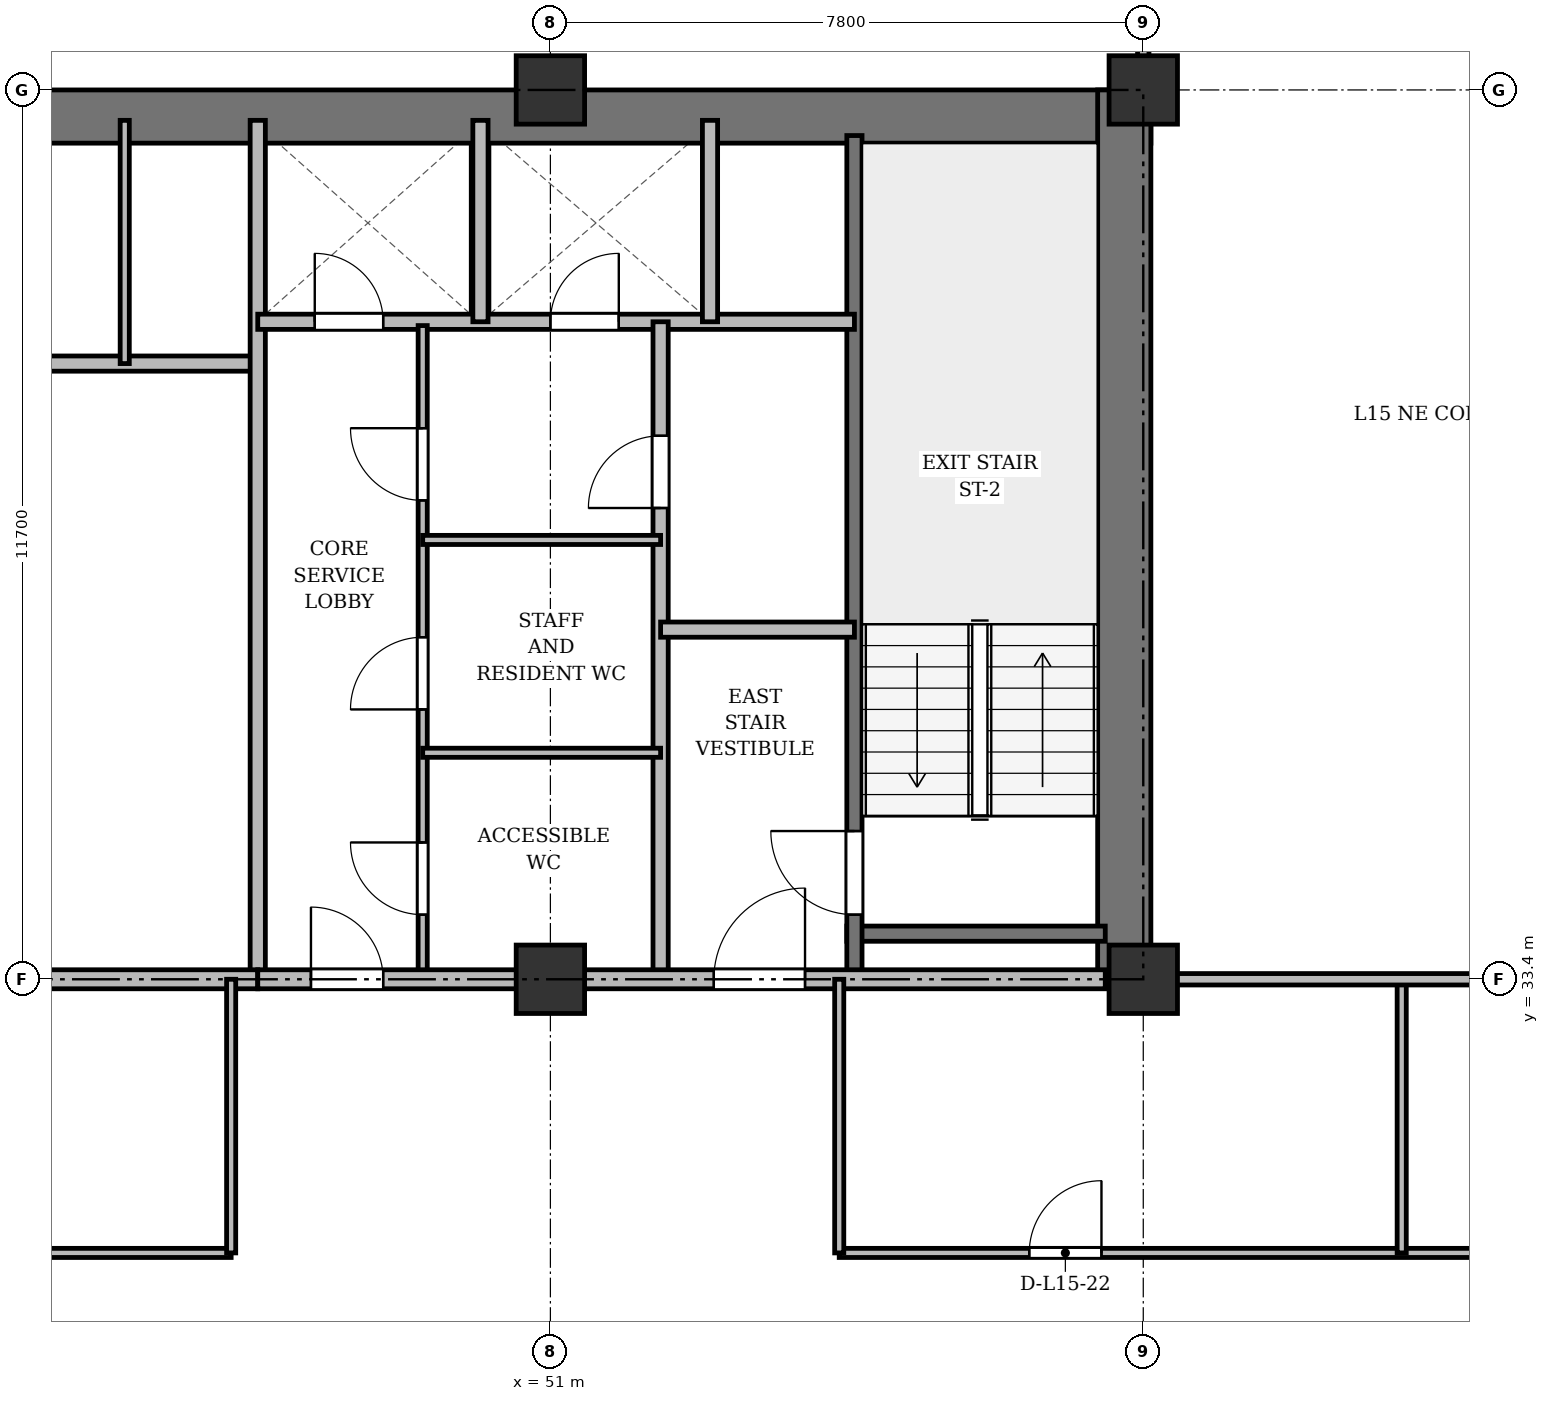
"""IFC4 building model, lengths in metres.
Left out: names, types, materials, properties, quantities, classifications, styles, units other than length and angle.
Written with IfcOpenShell. Run it as: python <this file> out.ifc"""

import sys

from ifc_helpers import new_model, si_unit, direction, frame, frame_2d, origin, origin_2d, place, context, subcontext, project, spatial, rectangle, extrude, source, transform, mapped, element, fill, save


model = new_model("IFC4")
c1 = context("Model", 3, precision=1e-05, world=origin(), true_north=direction((0.0, 1.0)))
c2 = subcontext(c1, "Body", "Model", "MODEL_VIEW")
j1 = project(units=[si_unit("LENGTHUNIT", "METRE"), si_unit("PLANEANGLEUNIT", "RADIAN")], contexts=[c1])
p1 = place(None, origin())
s1 = spatial("IfcSite", under=j1, at=p1, CompositionType="ELEMENT")
p2 = place(p1, origin())
s2 = spatial("IfcBuilding", under=s1, at=p2, CompositionType="ELEMENT")
p3 = place(p2, frame((0.0, 0.0, 59.5)))
s3 = spatial("IfcBuildingStorey", under=s2, at=p3, CompositionType="ELEMENT", Elevation=59.5)
m1 = source(origin(), c2, "Body", "SweptSolid", [
    extrude(rectangle(XDim=0.9, YDim=0.9, at=origin_2d()), origin(), (0.0, 0.0, 1.0), 3.6),
])
for number, where, z_axis, x_axis in (
    (1, (51.0, 33.4, 0.0), (0.0, 0.0, 1.0), (1.0, 0.0, 0.0)),
    (2, (51.0, 45.1, 0.0), (0.0, 0.0, 1.0), (1.0, 0.0, 0.0)),
    (3, (58.8, 33.4, 0.0), (0.0, 0.0, 1.0), (1.0, 0.0, 0.0)),
    (4, (58.8, 45.1, 0.0), (0.0, 0.0, 1.0), (1.0, 0.0, 0.0)),
):
    element("IfcColumn", number, at=place(p3, frame(where, z_axis=z_axis, x_axis=x_axis)), inside=s3, PredefinedType="COLUMN", context=c2, shape_type="MappedRepresentation", body=[
        mapped(m1, transform((0.0, 0.0, 0.0), x_axis=(1.0, 0.0, 0.0), y_axis=(0.0, 1.0, 0.0), z_axis=(0.0, 0.0, 1.0), scale=1.0)),
    ])
p4 = place(p3, frame((15.5, 44.75, 0.0), z_axis=(0.0, 0.0, 1.0), x_axis=(1.0, 0.0, 0.0)))
e5 = element("IfcWall", 5, at=p4, inside=s3, PredefinedType="SHEAR", context=c2, shape_type="SweptSolid", body=[
    extrude(rectangle(XDim=43.4, YDim=0.7, at=frame_2d((21.7, 0.0))), origin(), (0.0, 0.0, 1.0), 3.34),
])
p5 = place(p3, frame((58.55, 33.4, 0.0), z_axis=(0.0, 0.0, 1.0), x_axis=(0.0, 1.0, 0.0)))
e6 = element("IfcWall", 6, at=p5, inside=s3, PredefinedType="SHEAR", context=c2, shape_type="SweptSolid", body=[
    extrude(rectangle(XDim=11.7, YDim=0.7, at=frame_2d((5.85, 0.0))), origin(), (0.0, 0.0, 1.0), 3.34),
])
p6 = place(p3, frame((54.9, 34.0, 0.0), z_axis=(0.0, 0.0, 1.0), x_axis=(1.0, 0.0, 0.0)))
e7 = element("IfcWall", 7, at=p6, inside=s3, PredefinedType="SHEAR", context=c2, shape_type="SweptSolid", body=[
    extrude(rectangle(XDim=3.4, YDim=0.2, at=frame_2d((1.7, 0.0))), origin(), (0.0, 0.0, 1.0), 3.34),
])
p7 = place(p3, frame((55.0, 33.4, 0.0), z_axis=(0.0, 0.0, 1.0), x_axis=(0.0, 1.0, 0.0)))
e8 = element("IfcWall", 8, at=p7, inside=s3, PredefinedType="SHEAR", context=c2, shape_type="SweptSolid", body=[
    extrude(rectangle(XDim=11.1, YDim=0.2, at=frame_2d((5.55, 0.0))), origin(), (0.0, 0.0, 1.0), 3.34),
])
p8 = place(p7, frame((0.85, 0.0, 0.0)))
e9 = element("IfcOpeningElement", 9, at=p8, cuts=e8, PredefinedType="OPENING", context=c2, shape_type="SweptSolid", body=[
    extrude(rectangle(XDim=1.1, YDim=2.15, at=frame_2d((0.55, 1.075))), frame((0.0, 0.11, 0.0), z_axis=(0.0, -1.0, 0.0), x_axis=(1.0, 0.0, 0.0)), (0.0, 0.0, 1.0), 0.22),
])
p9 = place(p3, frame((40.25, 41.5, 0.0), z_axis=(0.0, 0.0, 1.0), x_axis=(1.0, 0.0, 0.0)))
e10 = element("IfcWall", 10, at=p9, inside=s3, PredefinedType="SOLIDWALL", context=c2, shape_type="SweptSolid", body=[
    extrude(rectangle(XDim=6.9, YDim=0.2, at=frame_2d((3.45, 0.0))), origin(), (0.0, 0.0, 1.0), 2.752),
])
p10 = place(p3, frame((45.4, 41.5, 0.0), z_axis=(0.0, 0.0, 1.0), x_axis=(0.0, 1.0, 0.0)))
e11 = element("IfcWall", 11, at=p10, inside=s3, PredefinedType="PARTITIONING", context=c2, shape_type="SweptSolid", body=[
    extrude(rectangle(XDim=3.2, YDim=0.12, at=frame_2d((1.6, 0.0))), origin(), (0.0, 0.0, 1.0), 3.34),
])
p11 = place(p3, frame((47.15, 33.4, 0.0), z_axis=(0.0, 0.0, 1.0), x_axis=(0.0, 1.0, 0.0)))
e12 = element("IfcWall", 12, at=p11, inside=s3, PredefinedType="SOLIDWALL", context=c2, shape_type="SweptSolid", body=[
    extrude(rectangle(XDim=11.3, YDim=0.2, at=frame_2d((5.65, 0.0))), origin(), (0.0, 0.0, 1.0), 2.69),
])
p12 = place(p3, frame((26.3, 33.4, 0.0), z_axis=(0.0, 0.0, 1.0), x_axis=(1.0, 0.0, 0.0)))
e13 = element("IfcWall", 13, at=p12, inside=s3, PredefinedType="PARTITIONING", context=c2, shape_type="SweptSolid", body=[
    extrude(rectangle(XDim=20.85, YDim=0.25, at=frame_2d((10.425, 0.0))), origin(), (0.0, 0.0, 1.0), 2.69),
])
p13 = place(p12, frame((9.2, 0.0, 0.0)))
e14 = element("IfcOpeningElement", 14, at=p13, cuts=e13, PredefinedType="OPENING", context=c2, shape_type="SweptSolid", body=[
    extrude(rectangle(XDim=1.6, YDim=2.2, at=frame_2d((0.8, 1.1))), frame((0.0, 0.135, 0.0), z_axis=(0.0, -1.0, 0.0), x_axis=(1.0, 0.0, 0.0)), (0.0, 0.0, 1.0), 0.27),
])
p14 = place(p3, frame((47.15, 42.05, 0.0), z_axis=(0.0, 0.0, 1.0), x_axis=(1.0, 0.0, 0.0)))
e15 = element("IfcWall", 15, at=p14, inside=s3, PredefinedType="SOLIDWALL", context=c2, shape_type="SweptSolid", body=[
    extrude(rectangle(XDim=7.85, YDim=0.2, at=frame_2d((3.925, 0.0))), origin(), (0.0, 0.0, 1.0), 2.752),
])
p15 = place(p14, frame((0.75, 0.0, 0.0)))
e16 = element("IfcOpeningElement", 16, at=p15, cuts=e15, PredefinedType="OPENING", context=c2, shape_type="SweptSolid", body=[
    extrude(rectangle(XDim=0.9, YDim=2.1, at=frame_2d((0.45, 1.05))), frame((0.0, 0.11, 0.0), z_axis=(0.0, -1.0, 0.0), x_axis=(1.0, 0.0, 0.0)), (0.0, 0.0, 1.0), 0.22),
])
p16 = place(p14, frame((3.85, 0.0, 0.0)))
e17 = element("IfcOpeningElement", 17, at=p16, cuts=e15, PredefinedType="OPENING", context=c2, shape_type="SweptSolid", body=[
    extrude(rectangle(XDim=0.9, YDim=2.1, at=frame_2d((0.45, 1.05))), frame((0.0, 0.11, 0.0), z_axis=(0.0, -1.0, 0.0), x_axis=(1.0, 0.0, 0.0)), (0.0, 0.0, 1.0), 0.22),
])
for number, where, z_axis, x_axis in (
    (18, (50.08, 42.05, 0.0), (0.0, 0.0, 1.0), (0.0, 1.0, 0.0)),
    (19, (53.1, 42.05, 0.0), (0.0, 0.0, 1.0), (0.0, 1.0, 0.0)),
):
    element("IfcWall", number, at=place(p3, frame(where, z_axis=z_axis, x_axis=x_axis)), inside=s3, PredefinedType="SOLIDWALL", context=c2, shape_type="SweptSolid", body=[
        extrude(rectangle(XDim=2.65, YDim=0.2, at=frame_2d((1.325, 0.0))), origin(), (0.0, 0.0, 1.0), 3.34),
    ])
p17 = place(p3, frame((52.45, 33.4, 0.0), z_axis=(0.0, 0.0, 1.0), x_axis=(0.0, 1.0, 0.0)))
e20 = element("IfcWall", 20, at=p17, inside=s3, PredefinedType="PARTITIONING", context=c2, shape_type="SweptSolid", body=[
    extrude(rectangle(XDim=8.65, YDim=0.2, at=frame_2d((4.325, 0.0))), origin(), (0.0, 0.0, 1.0), 2.69),
])
p18 = place(p17, frame((6.2, 0.0, 0.0)))
e21 = element("IfcOpeningElement", 21, at=p18, cuts=e20, PredefinedType="OPENING", context=c2, shape_type="SweptSolid", body=[
    extrude(rectangle(XDim=0.95, YDim=2.15, at=frame_2d((0.475, 1.075))), frame((0.0, 0.11, 0.0), z_axis=(0.0, -1.0, 0.0), x_axis=(1.0, 0.0, 0.0)), (0.0, 0.0, 1.0), 0.22),
])
p19 = place(p3, frame((52.45, 38.0, 0.0), z_axis=(0.0, 0.0, 1.0), x_axis=(1.0, 0.0, 0.0)))
e22 = element("IfcWall", 22, at=p19, inside=s3, PredefinedType="PARTITIONING", context=c2, shape_type="SweptSolid", body=[
    extrude(rectangle(XDim=2.55, YDim=0.2, at=frame_2d((1.275, 0.0))), origin(), (0.0, 0.0, 1.0), 3.34),
])
p20 = place(p3, frame((49.32, 33.4, 0.0), z_axis=(0.0, 0.0, 1.0), x_axis=(0.0, 1.0, 0.0)))
e23 = element("IfcWall", 23, at=p20, inside=s3, PredefinedType="PARTITIONING", context=c2, shape_type="SweptSolid", body=[
    extrude(rectangle(XDim=8.6, YDim=0.12, at=frame_2d((4.3, 0.0))), origin(), (0.0, 0.0, 1.0), 2.69),
])
p21 = place(p20, frame((0.85, 0.0, 0.0)))
e24 = element("IfcOpeningElement", 24, at=p21, cuts=e23, PredefinedType="OPENING", context=c2, shape_type="SweptSolid", body=[
    extrude(rectangle(XDim=0.95, YDim=2.15, at=frame_2d((0.475, 1.075))), frame((0.0, 0.07, 0.0), z_axis=(0.0, -1.0, 0.0), x_axis=(1.0, 0.0, 0.0)), (0.0, 0.0, 1.0), 0.14),
])
p22 = place(p20, frame((3.55, 0.0, 0.0)))
e25 = element("IfcOpeningElement", 25, at=p22, cuts=e23, PredefinedType="OPENING", context=c2, shape_type="SweptSolid", body=[
    extrude(rectangle(XDim=0.95, YDim=2.15, at=frame_2d((0.475, 1.075))), frame((0.0, 0.07, 0.0), z_axis=(0.0, -1.0, 0.0), x_axis=(1.0, 0.0, 0.0)), (0.0, 0.0, 1.0), 0.14),
])
p23 = place(p20, frame((6.3, 0.0, 0.0)))
e26 = element("IfcOpeningElement", 26, at=p23, cuts=e23, PredefinedType="OPENING", context=c2, shape_type="SweptSolid", body=[
    extrude(rectangle(XDim=0.95, YDim=2.15, at=frame_2d((0.475, 1.075))), frame((0.0, 0.07, 0.0), z_axis=(0.0, -1.0, 0.0), x_axis=(1.0, 0.0, 0.0)), (0.0, 0.0, 1.0), 0.14),
])
for number, where, z_axis, x_axis in (
    (27, (49.32, 36.38, 0.0), (0.0, 0.0, 1.0), (1.0, 0.0, 0.0)),
    (28, (49.32, 39.18, 0.0), (0.0, 0.0, 1.0), (1.0, 0.0, 0.0)),
):
    element("IfcWall", number, at=place(p3, frame(where, z_axis=z_axis, x_axis=x_axis)), inside=s3, PredefinedType="PARTITIONING", context=c2, shape_type="SweptSolid", body=[
        extrude(rectangle(XDim=3.13, YDim=0.12, at=frame_2d((1.565, 0.0))), origin(), (0.0, 0.0, 1.0), 2.752),
    ])
p24 = place(p3, frame((47.15, 33.4, 0.0), z_axis=(0.0, 0.0, 1.0), x_axis=(1.0, 0.0, 0.0)))
e29 = element("IfcWall", 29, at=p24, inside=s3, PredefinedType="PARTITIONING", context=c2, shape_type="SweptSolid", body=[
    extrude(rectangle(XDim=11.15, YDim=0.25, at=frame_2d((5.575, 0.0))), origin(), (0.0, 0.0, 1.0), 2.69),
])
p25 = place(p24, frame((0.7, 0.0, 0.0)))
e30 = element("IfcOpeningElement", 30, at=p25, cuts=e29, PredefinedType="OPENING", context=c2, shape_type="SweptSolid", body=[
    extrude(rectangle(XDim=0.95, YDim=2.15, at=frame_2d((0.475, 1.075))), frame((0.0, 0.135, 0.0), z_axis=(0.0, -1.0, 0.0), x_axis=(1.0, 0.0, 0.0)), (0.0, 0.0, 1.0), 0.27),
])
p26 = place(p24, frame((6.0, 0.0, 0.0)))
e31 = element("IfcOpeningElement", 31, at=p26, cuts=e29, PredefinedType="OPENING", context=c2, shape_type="SweptSolid", body=[
    extrude(rectangle(XDim=1.2, YDim=2.15, at=frame_2d((0.6, 1.075))), frame((0.0, 0.135, 0.0), z_axis=(0.0, -1.0, 0.0), x_axis=(1.0, 0.0, 0.0)), (0.0, 0.0, 1.0), 0.27),
])
p27 = place(p3, frame((38.2, 29.8, 0.0), z_axis=(0.0, 0.0, 1.0), x_axis=(1.0, 0.0, 0.0)))
e32 = element("IfcWall", 32, at=p27, inside=s3, PredefinedType="PARTITIONING", context=c2, shape_type="SweptSolid", body=[
    extrude(rectangle(XDim=8.6, YDim=0.12, at=frame_2d((4.3, 0.0))), origin(), (0.0, 0.0, 1.0), 2.752),
])
p28 = place(p27, frame((3.462, 0.0, 0.0)))
e33 = element("IfcOpeningElement", 33, at=p28, cuts=e32, PredefinedType="OPENING", context=c2, shape_type="SweptSolid", body=[
    extrude(rectangle(XDim=0.95, YDim=2.15, at=frame_2d((0.475, 1.075))), frame((0.0, 0.07, 0.0), z_axis=(0.0, -1.0, 0.0), x_axis=(1.0, 0.0, 0.0)), (0.0, 0.0, 1.0), 0.14),
])
p29 = place(p3, frame((54.8, 29.8, 0.0), z_axis=(0.0, 0.0, 1.0), x_axis=(1.0, 0.0, 0.0)))
e34 = element("IfcWall", 34, at=p29, inside=s3, PredefinedType="PARTITIONING", context=c2, shape_type="SweptSolid", body=[
    extrude(rectangle(XDim=14.85, YDim=0.12, at=frame_2d((7.425, 0.0))), origin(), (0.0, 0.0, 1.0), 2.752),
])
p30 = place(p29, frame((2.5, 0.0, 0.0)))
e35 = element("IfcOpeningElement", 35, at=p30, cuts=e34, PredefinedType="OPENING", context=c2, shape_type="SweptSolid", body=[
    extrude(rectangle(XDim=0.95, YDim=2.15, at=frame_2d((0.475, 1.075))), frame((0.0, 0.07, 0.0), z_axis=(0.0, -1.0, 0.0), x_axis=(1.0, 0.0, 0.0)), (0.0, 0.0, 1.0), 0.14),
])
p31 = place(p29, frame((9.2, 0.0, 0.0)))
e36 = element("IfcOpeningElement", 36, at=p31, cuts=e34, PredefinedType="OPENING", context=c2, shape_type="SweptSolid", body=[
    extrude(rectangle(XDim=0.95, YDim=2.15, at=frame_2d((0.475, 1.075))), frame((0.0, 0.07, 0.0), z_axis=(0.0, -1.0, 0.0), x_axis=(1.0, 0.0, 0.0)), (0.0, 0.0, 1.0), 0.14),
])
for number, where, z_axis, x_axis in (
    (37, (62.2, 29.8, 0.0), (0.0, 0.0, 1.0), (0.0, 1.0, 0.0)),
    (38, (46.8, 29.8, 0.0), (0.0, 0.0, 1.0), (0.0, 1.0, 0.0)),
    (39, (54.8, 29.8, 0.0), (0.0, 0.0, 1.0), (0.0, 1.0, 0.0)),
):
    element("IfcWall", number, at=place(p3, frame(where, z_axis=z_axis, x_axis=x_axis)), inside=s3, PredefinedType="PARTITIONING", context=c2, shape_type="SweptSolid", body=[
        extrude(rectangle(XDim=3.6, YDim=0.12, at=frame_2d((1.8, 0.0))), origin(), (0.0, 0.0, 1.0), 2.69),
    ])
p32 = place(p3, frame((58.8, 33.4, 0.0), z_axis=(0.0, 0.0, 1.0), x_axis=(1.0, 0.0, 0.0)))
e40 = element("IfcWall", 40, at=p32, inside=s3, PredefinedType="PARTITIONING", context=c2, shape_type="SweptSolid", body=[
    extrude(rectangle(XDim=10.85, YDim=0.15, at=frame_2d((5.425, 0.0))), origin(), (0.0, 0.0, 1.0), 2.69),
])
p33 = place(p32, frame((4.76, 0.0, 0.0)))
e41 = element("IfcOpeningElement", 41, at=p33, cuts=e40, PredefinedType="OPENING", context=c2, shape_type="SweptSolid", body=[
    extrude(rectangle(XDim=0.95, YDim=2.15, at=frame_2d((0.475, 1.075))), frame((0.0, 0.085, 0.0), z_axis=(0.0, -1.0, 0.0), x_axis=(1.0, 0.0, 0.0)), (0.0, 0.0, 1.0), 0.17),
])
p34 = place(p3, frame((58.8, 44.75, 0.0), z_axis=(0.0, 0.0, 1.0), x_axis=(0.0, 1.0, 0.0)))
e42 = element("IfcWall", 42, at=p34, inside=s3, PredefinedType="PARTITIONING", context=c2, shape_type="SweptSolid", body=[
    extrude(rectangle(XDim=3.61, YDim=0.15, at=frame_2d((1.805, 0.0))), origin(), (0.0, 0.0, 1.0), 2.752),
])
p35 = place(p34, frame((1.1, 0.0, 0.0)))
e43 = element("IfcOpeningElement", 43, at=p35, cuts=e42, PredefinedType="OPENING", context=c2, shape_type="SweptSolid", body=[
    extrude(rectangle(XDim=0.95, YDim=2.15, at=frame_2d((0.475, 1.075))), frame((0.0, 0.085, 0.0), z_axis=(0.0, -1.0, 0.0), x_axis=(1.0, 0.0, 0.0)), (0.0, 0.0, 1.0), 0.17),
])
m2 = source(origin(), c2, "Body", "SweptSolid", [
    extrude(rectangle(XDim=1.1, YDim=2.15, at=frame_2d((0.55, 1.075))), frame((0.0, 0.025, 0.0), z_axis=(0.0, -1.0, 0.0), x_axis=(1.0, 0.0, 0.0)), (0.0, 0.0, 1.0), 0.05),
])
p36 = place(p8, origin())
e44 = element("IfcDoor", 44, at=p36, inside=s3, OperationType="SINGLE_SWING_RIGHT", PredefinedType="DOOR", context=c2, shape_type="MappedRepresentation", body=[
    mapped(m2, transform((0.0, 0.0, 0.0), x_axis=(1.0, 0.0, 0.0), y_axis=(0.0, 1.0, 0.0), z_axis=(0.0, 0.0, 1.0), scale=1.0)),
])
fill(e9, e44)
m3 = source(origin(), c2, "Body", "SweptSolid", [
    extrude(rectangle(XDim=0.9, YDim=2.1, at=frame_2d((0.45, 1.05))), frame((0.0, 0.025, 0.0), z_axis=(0.0, -1.0, 0.0), x_axis=(1.0, 0.0, 0.0)), (0.0, 0.0, 1.0), 0.05),
])
p37 = place(p15, origin())
e45 = element("IfcDoor", 45, at=p37, inside=s3, OperationType="SINGLE_SWING_LEFT", PredefinedType="DOOR", context=c2, shape_type="MappedRepresentation", body=[
    mapped(m3, transform((0.0, 0.0, 0.0), x_axis=(1.0, 0.0, 0.0), y_axis=(0.0, 1.0, 0.0), z_axis=(0.0, 0.0, 1.0), scale=1.0)),
])
fill(e16, e45)
p38 = place(p16, origin())
e46 = element("IfcDoor", 46, at=p38, inside=s3, OperationType="SINGLE_SWING_RIGHT", PredefinedType="DOOR", context=c2, shape_type="MappedRepresentation", body=[
    mapped(m3, transform((0.0, 0.0, 0.0), x_axis=(1.0, 0.0, 0.0), y_axis=(0.0, 1.0, 0.0), z_axis=(0.0, 0.0, 1.0), scale=1.0)),
])
fill(e17, e46)
m4 = source(origin(), c2, "Body", "SweptSolid", [
    extrude(rectangle(XDim=0.95, YDim=2.15, at=frame_2d((0.475, 1.075))), frame((0.0, 0.025, 0.0), z_axis=(0.0, -1.0, 0.0), x_axis=(1.0, 0.0, 0.0)), (0.0, 0.0, 1.0), 0.05),
])
p39 = place(p18, origin())
e47 = element("IfcDoor", 47, at=p39, inside=s3, OperationType="SINGLE_SWING_LEFT", PredefinedType="DOOR", context=c2, shape_type="MappedRepresentation", body=[
    mapped(m4, transform((0.0, 0.0, 0.0), x_axis=(1.0, 0.0, 0.0), y_axis=(0.0, 1.0, 0.0), z_axis=(0.0, 0.0, 1.0), scale=1.0)),
])
fill(e21, e47)
p40 = place(p21, origin())
e48 = element("IfcDoor", 48, at=p40, inside=s3, OperationType="SINGLE_SWING_RIGHT", PredefinedType="DOOR", context=c2, shape_type="MappedRepresentation", body=[
    mapped(m4, transform((0.0, 0.0, 0.0), x_axis=(1.0, 0.0, 0.0), y_axis=(0.0, 1.0, 0.0), z_axis=(0.0, 0.0, 1.0), scale=1.0)),
])
fill(e24, e48)
p41 = place(p22, origin())
e49 = element("IfcDoor", 49, at=p41, inside=s3, OperationType="SINGLE_SWING_LEFT", PredefinedType="DOOR", context=c2, shape_type="MappedRepresentation", body=[
    mapped(m4, transform((0.0, 0.0, 0.0), x_axis=(1.0, 0.0, 0.0), y_axis=(0.0, 1.0, 0.0), z_axis=(0.0, 0.0, 1.0), scale=1.0)),
])
fill(e25, e49)
p42 = place(p23, origin())
e50 = element("IfcDoor", 50, at=p42, inside=s3, OperationType="SINGLE_SWING_RIGHT", PredefinedType="DOOR", context=c2, shape_type="MappedRepresentation", body=[
    mapped(m4, transform((0.0, 0.0, 0.0), x_axis=(1.0, 0.0, 0.0), y_axis=(0.0, 1.0, 0.0), z_axis=(0.0, 0.0, 1.0), scale=1.0)),
])
fill(e26, e50)
p43 = place(p25, origin())
e51 = element("IfcDoor", 51, at=p43, inside=s3, OperationType="SINGLE_SWING_LEFT", PredefinedType="DOOR", context=c2, shape_type="MappedRepresentation", body=[
    mapped(m4, transform((0.0, 0.0, 0.0), x_axis=(1.0, 0.0, 0.0), y_axis=(0.0, 1.0, 0.0), z_axis=(0.0, 0.0, 1.0), scale=1.0)),
])
fill(e30, e51)
m5 = source(origin(), c2, "Body", "SweptSolid", [
    extrude(rectangle(XDim=1.2, YDim=2.15, at=frame_2d((0.6, 1.075))), frame((0.0, 0.025, 0.0), z_axis=(0.0, -1.0, 0.0), x_axis=(1.0, 0.0, 0.0)), (0.0, 0.0, 1.0), 0.05),
])
p44 = place(p26, origin())
e52 = element("IfcDoor", 52, at=p44, inside=s3, OperationType="SINGLE_SWING_RIGHT", PredefinedType="DOOR", context=c2, shape_type="MappedRepresentation", body=[
    mapped(m5, transform((0.0, 0.0, 0.0), x_axis=(1.0, 0.0, 0.0), y_axis=(0.0, 1.0, 0.0), z_axis=(0.0, 0.0, 1.0), scale=1.0)),
])
fill(e31, e52)
p45 = place(p30, origin())
e53 = element("IfcDoor", 53, at=p45, inside=s3, OperationType="SINGLE_SWING_RIGHT", PredefinedType="DOOR", context=c2, shape_type="MappedRepresentation", body=[
    mapped(m4, transform((0.0, 0.0, 0.0), x_axis=(1.0, 0.0, 0.0), y_axis=(0.0, 1.0, 0.0), z_axis=(0.0, 0.0, 1.0), scale=1.0)),
])
fill(e35, e53)
save(model, sys.argv[1])
